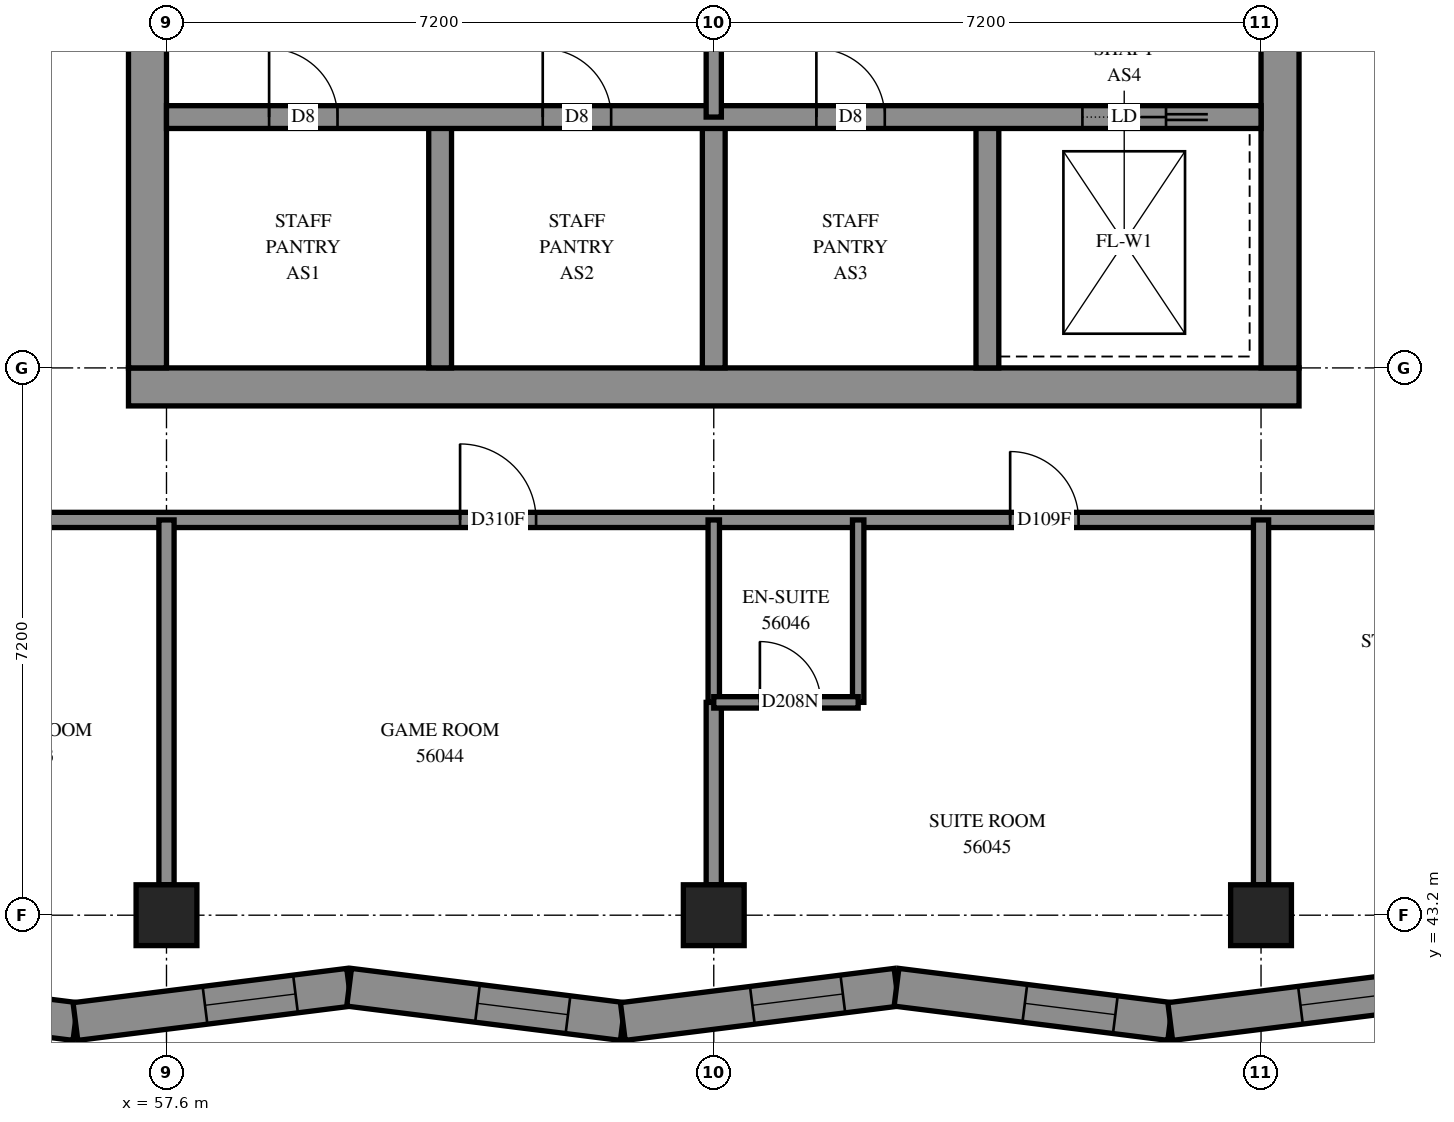
"""IFC4 building model, lengths in metres.
Left out: names, types, materials, properties, quantities, classifications, styles, units other than length and angle.
Written with IfcOpenShell. Run it as: python <this file> out.ifc"""

import sys

from ifc_helpers import new_model, si_unit, direction, frame, frame_2d, origin, origin_2d, place, context, subcontext, project, spatial, polyline, rectangle, outline, extrude, element, fill, save


model = new_model("IFC4")
c1 = context("Model", 3, precision=1e-05, world=origin(), true_north=direction((0.0, 1.0)))
c2 = subcontext(c1, "Body", "Model", "MODEL_VIEW")
j1 = project(units=[si_unit("LENGTHUNIT", "METRE"), si_unit("PLANEANGLEUNIT", "RADIAN")], contexts=[c1])
p1 = place(None, origin())
s1 = spatial("IfcSite", under=j1, at=p1, CompositionType="ELEMENT")
p2 = place(p1, origin())
s2 = spatial("IfcBuilding", under=s1, at=p2, CompositionType="ELEMENT")
p3 = place(p2, frame((0.0, 0.0, 206.6)))
s3 = spatial("IfcBuildingStorey", under=s2, at=p3, CompositionType="ELEMENT", Elevation=206.6)
for number, where, z_axis, x_axis in (
    (1, (57.6, 43.2, 0.0), (0.0, 0.0, 1.0), (1.0, 0.0, 0.0)),
    (2, (64.8, 43.2, 0.0), (0.0, 0.0, 1.0), (1.0, 0.0, 0.0)),
    (3, (72.0, 43.2, 0.0), (0.0, 0.0, 1.0), (1.0, 0.0, 0.0)),
):
    element("IfcColumn", number, at=place(p3, frame(where, z_axis=z_axis, x_axis=x_axis)), inside=s3, PredefinedType="COLUMN", context=c2, shape_type="SweptSolid", body=[
        extrude(rectangle(XDim=0.8, YDim=0.8, at=origin_2d()), origin(), (0.0, 0.0, 1.0), 3.1),
    ])
p4 = place(p3, frame((57.1, 50.15, -0.3), z_axis=(0.0, 0.0, 1.0), x_axis=(1.0, 0.0, 0.0)))
e4 = element("IfcWall", 4, at=p4, inside=s3, PredefinedType="SHEAR", context=c2, shape_type="SweptSolid", body=[
    extrude(rectangle(XDim=15.4, YDim=0.5, at=frame_2d((7.7, 0.0))), origin(), (0.0, 0.0, 1.0), 2.7),
])
p5 = place(p3, frame((57.35, 50.4, -0.3), z_axis=(0.0, 0.0, 1.0), x_axis=(0.0, 1.0, 0.0)))
e5 = element("IfcWall", 5, at=p5, inside=s3, PredefinedType="SHEAR", context=c2, shape_type="SweptSolid", body=[
    extrude(rectangle(XDim=14.4, YDim=0.5, at=frame_2d((7.2, 0.0))), origin(), (0.0, 0.0, 1.0), 2.7),
])
p6 = place(p5, frame((4.55, 0.0, 0.3)))
e6 = element("IfcOpeningElement", 6, at=p6, cuts=e5, PredefinedType="OPENING", context=c2, shape_type="SweptSolid", body=[
    extrude(rectangle(XDim=1.1, YDim=2.1, at=frame_2d((0.55, 1.05))), frame((0.0, 0.26, 0.0), z_axis=(0.0, -1.0, 0.0), x_axis=(1.0, 0.0, 0.0)), (0.0, 0.0, 1.0), 0.52),
])
p7 = place(p5, frame((11.35, 0.0, 0.3)))
e7 = element("IfcOpeningElement", 7, at=p7, cuts=e5, PredefinedType="OPENING", context=c2, shape_type="SweptSolid", body=[
    extrude(rectangle(XDim=1.1, YDim=2.1, at=frame_2d((0.55, 1.05))), frame((0.0, 0.26, 0.0), z_axis=(0.0, -1.0, 0.0), x_axis=(1.0, 0.0, 0.0)), (0.0, 0.0, 1.0), 0.52),
])
p8 = place(p3, frame((72.25, 50.4, -0.3), z_axis=(0.0, 0.0, 1.0), x_axis=(0.0, 1.0, 0.0)))
e8 = element("IfcWall", 8, at=p8, inside=s3, PredefinedType="SHEAR", context=c2, shape_type="SweptSolid", body=[
    extrude(rectangle(XDim=14.4, YDim=0.5, at=frame_2d((7.2, 0.0))), origin(), (0.0, 0.0, 1.0), 2.7),
])
p9 = place(p8, frame((4.55, 0.0, 0.3)))
e9 = element("IfcOpeningElement", 9, at=p9, cuts=e8, PredefinedType="OPENING", context=c2, shape_type="SweptSolid", body=[
    extrude(rectangle(XDim=1.1, YDim=2.1, at=frame_2d((0.55, 1.05))), frame((0.0, 0.26, 0.0), z_axis=(0.0, -1.0, 0.0), x_axis=(1.0, 0.0, 0.0)), (0.0, 0.0, 1.0), 0.52),
])
p10 = place(p8, frame((11.35, 0.0, 0.3)))
e10 = element("IfcOpeningElement", 10, at=p10, cuts=e8, PredefinedType="OPENING", context=c2, shape_type="SweptSolid", body=[
    extrude(rectangle(XDim=1.1, YDim=2.1, at=frame_2d((0.55, 1.05))), frame((0.0, 0.26, 0.0), z_axis=(0.0, -1.0, 0.0), x_axis=(1.0, 0.0, 0.0)), (0.0, 0.0, 1.0), 0.52),
])
for number, where, z_axis, x_axis in (
    (11, (61.2, 50.4, 0.0), (0.0, 0.0, 1.0), (0.0, 1.0, 0.0)),
    (12, (64.8, 50.4, 0.0), (0.0, 0.0, 1.0), (0.0, 1.0, 0.0)),
    (13, (68.4, 50.4, 0.0), (0.0, 0.0, 1.0), (0.0, 1.0, 0.0)),
):
    element("IfcWall", number, at=place(p3, frame(where, z_axis=z_axis, x_axis=x_axis)), inside=s3, PredefinedType="SOLIDWALL", context=c2, shape_type="SweptSolid", body=[
        extrude(rectangle(XDim=3.3, YDim=0.3, at=frame_2d((1.65, 0.0))), origin(), (0.0, 0.0, 1.0), 3.1),
    ])
p11 = place(p3, frame((57.6, 53.7, 0.0), z_axis=(0.0, 0.0, 1.0), x_axis=(1.0, 0.0, 0.0)))
e14 = element("IfcWall", 14, at=p11, inside=s3, PredefinedType="SOLIDWALL", context=c2, shape_type="SweptSolid", body=[
    extrude(rectangle(XDim=14.4, YDim=0.3, at=frame_2d((7.2, 0.0))), origin(), (0.0, 0.0, 1.0), 3.1),
])
p12 = place(p11, frame((1.35, 0.0, 0.0)))
e15 = element("IfcOpeningElement", 15, at=p12, cuts=e14, PredefinedType="OPENING", context=c2, shape_type="SweptSolid", body=[
    extrude(rectangle(XDim=0.9, YDim=2.1, at=frame_2d((0.45, 1.05))), frame((0.0, 0.16, 0.0), z_axis=(0.0, -1.0, 0.0), x_axis=(1.0, 0.0, 0.0)), (0.0, 0.0, 1.0), 0.32),
])
p13 = place(p11, frame((4.95, 0.0, 0.0)))
e16 = element("IfcOpeningElement", 16, at=p13, cuts=e14, PredefinedType="OPENING", context=c2, shape_type="SweptSolid", body=[
    extrude(rectangle(XDim=0.9, YDim=2.1, at=frame_2d((0.45, 1.05))), frame((0.0, 0.16, 0.0), z_axis=(0.0, -1.0, 0.0), x_axis=(1.0, 0.0, 0.0)), (0.0, 0.0, 1.0), 0.32),
])
p14 = place(p11, frame((8.55, 0.0, 0.0)))
e17 = element("IfcOpeningElement", 17, at=p14, cuts=e14, PredefinedType="OPENING", context=c2, shape_type="SweptSolid", body=[
    extrude(rectangle(XDim=0.9, YDim=2.1, at=frame_2d((0.45, 1.05))), frame((0.0, 0.16, 0.0), z_axis=(0.0, -1.0, 0.0), x_axis=(1.0, 0.0, 0.0)), (0.0, 0.0, 1.0), 0.32),
])
p15 = place(p11, frame((12.05, 0.0, 0.0)))
e18 = element("IfcOpeningElement", 18, at=p15, cuts=e14, PredefinedType="OPENING", context=c2, shape_type="SweptSolid", body=[
    extrude(rectangle(XDim=1.1, YDim=2.1, at=frame_2d((0.55, 1.05))), frame((0.0, 0.16, 0.0), z_axis=(0.0, -1.0, 0.0), x_axis=(1.0, 0.0, 0.0)), (0.0, 0.0, 1.0), 0.32),
])
p16 = place(p3, frame((52.781, 42.255, 0.0), z_axis=(0.0, 0.0, 1.0), x_axis=(0.9922491844, -0.1242640575, 0.0)))
e19 = element("IfcWall", 19, at=p16, inside=s3, PredefinedType="SOLIDWALL", context=c2, shape_type="SweptSolid", body=[
    extrude(outline(polyline([(0.052, -0.25), (3.681, -0.25), (3.618, 0.25), (-0.052, 0.25), (0.052, -0.25)])), origin(), (0.0, 0.0, 1.0), 3.1),
])
p17 = place(p16, frame((1.724, 0.0, 0.45)))
e20 = element("IfcOpeningElement", 20, at=p17, cuts=e19, PredefinedType="OPENING", context=c2, shape_type="SweptSolid", body=[
    extrude(rectangle(XDim=1.2, YDim=2.5, at=frame_2d((0.6, 1.25))), frame((0.0, 0.26, 0.0), z_axis=(0.0, -1.0, 0.0), x_axis=(1.0, 0.0, 0.0)), (0.0, 0.0, 1.0), 0.52),
])
p18 = place(p3, frame((56.402, 41.801, 0.0), z_axis=(0.0, 0.0, 1.0), x_axis=(0.9922477484, 0.124275524, 0.0)))
e21 = element("IfcWall", 21, at=p18, inside=s3, PredefinedType="SOLIDWALL", context=c2, shape_type="SweptSolid", body=[
    extrude(outline(polyline([(-0.031, -0.25), (3.598, -0.25), (3.66, 0.25), (0.031, 0.25), (-0.031, -0.25)])), origin(), (0.0, 0.0, 1.0), 3.1),
])
p19 = place(p18, frame((1.718, 0.0, 0.45)))
e22 = element("IfcOpeningElement", 22, at=p19, cuts=e21, PredefinedType="OPENING", context=c2, shape_type="SweptSolid", body=[
    extrude(rectangle(XDim=1.2, YDim=2.5, at=frame_2d((0.6, 1.25))), frame((0.0, 0.26, 0.0), z_axis=(0.0, -1.0, 0.0), x_axis=(1.0, 0.0, 0.0)), (0.0, 0.0, 1.0), 0.52),
])
p20 = place(p3, frame((60.003, 42.252, 0.0), z_axis=(0.0, 0.0, 1.0), x_axis=(0.9922477484, -0.124275524, 0.0)))
e23 = element("IfcWall", 23, at=p20, inside=s3, PredefinedType="SOLIDWALL", context=c2, shape_type="SweptSolid", body=[
    extrude(outline(polyline([(0.031, -0.25), (3.66, -0.25), (3.598, 0.25), (-0.031, 0.25), (0.031, -0.25)])), origin(), (0.0, 0.0, 1.0), 3.1),
])
p21 = place(p20, frame((1.702, 0.0, 0.45)))
e24 = element("IfcOpeningElement", 24, at=p21, cuts=e23, PredefinedType="OPENING", context=c2, shape_type="SweptSolid", body=[
    extrude(rectangle(XDim=1.2, YDim=2.5, at=frame_2d((0.6, 1.25))), frame((0.0, 0.26, 0.0), z_axis=(0.0, -1.0, 0.0), x_axis=(1.0, 0.0, 0.0)), (0.0, 0.0, 1.0), 0.52),
])
p22 = place(p3, frame((63.603, 41.801, 0.0), z_axis=(0.0, 0.0, 1.0), x_axis=(0.9922473228, 0.1242789221, 0.0)))
e25 = element("IfcWall", 25, at=p22, inside=s3, PredefinedType="SOLIDWALL", context=c2, shape_type="SweptSolid", body=[
    extrude(outline(polyline([(-0.031, -0.25), (3.598, -0.25), (3.66, 0.25), (0.031, 0.25), (-0.031, -0.25)])), origin(), (0.0, 0.0, 1.0), 3.1),
])
p23 = place(p22, frame((1.717, 0.0, 0.45)))
e26 = element("IfcOpeningElement", 26, at=p23, cuts=e25, PredefinedType="OPENING", context=c2, shape_type="SweptSolid", body=[
    extrude(rectangle(XDim=1.2, YDim=2.5, at=frame_2d((0.6, 1.25))), frame((0.0, 0.26, 0.0), z_axis=(0.0, -1.0, 0.0), x_axis=(1.0, 0.0, 0.0)), (0.0, 0.0, 1.0), 0.52),
])
p24 = place(p3, frame((67.204, 42.252, 0.0), z_axis=(0.0, 0.0, 1.0), x_axis=(0.9922477484, -0.124275524, 0.0)))
e27 = element("IfcWall", 27, at=p24, inside=s3, PredefinedType="SOLIDWALL", context=c2, shape_type="SweptSolid", body=[
    extrude(outline(polyline([(0.031, -0.25), (3.66, -0.25), (3.598, 0.25), (-0.031, 0.25), (0.031, -0.25)])), origin(), (0.0, 0.0, 1.0), 3.1),
])
p25 = place(p24, frame((1.701, 0.0, 0.45)))
e28 = element("IfcOpeningElement", 28, at=p25, cuts=e27, PredefinedType="OPENING", context=c2, shape_type="SweptSolid", body=[
    extrude(rectangle(XDim=1.2, YDim=2.5, at=frame_2d((0.6, 1.25))), frame((0.0, 0.26, 0.0), z_axis=(0.0, -1.0, 0.0), x_axis=(1.0, 0.0, 0.0)), (0.0, 0.0, 1.0), 0.52),
])
p26 = place(p3, frame((70.805, 41.801, 0.0), z_axis=(0.0, 0.0, 1.0), x_axis=(0.9922491844, 0.1242640575, 0.0)))
e29 = element("IfcWall", 29, at=p26, inside=s3, PredefinedType="SOLIDWALL", context=c2, shape_type="SweptSolid", body=[
    extrude(outline(polyline([(-0.031, -0.25), (3.598, -0.25), (3.701, 0.25), (0.031, 0.25), (-0.031, -0.25)])), origin(), (0.0, 0.0, 1.0), 3.1),
])
p27 = place(p26, frame((1.727, 0.0, 0.45)))
e30 = element("IfcOpeningElement", 30, at=p27, cuts=e29, PredefinedType="OPENING", context=c2, shape_type="SweptSolid", body=[
    extrude(rectangle(XDim=1.2, YDim=2.5, at=frame_2d((0.6, 1.25))), frame((0.0, 0.26, 0.0), z_axis=(0.0, -1.0, 0.0), x_axis=(1.0, 0.0, 0.0)), (0.0, 0.0, 1.0), 0.52),
])
p28 = place(p3, frame((64.8, 53.7, 0.0), z_axis=(0.0, 0.0, 1.0), x_axis=(0.0, 1.0, 0.0)))
e31 = element("IfcWall", 31, at=p28, inside=s3, PredefinedType="PARTITIONING", context=c2, shape_type="SweptSolid", body=[
    extrude(rectangle(XDim=3.6, YDim=0.2, at=frame_2d((1.8, 0.0))), origin(), (0.0, 0.0, 1.0), 3.1),
])
p29 = place(p3, frame((55.6, 48.4, 0.0), z_axis=(0.0, 0.0, 1.0), x_axis=(1.0, 0.0, 0.0)))
e32 = element("IfcWall", 32, at=p29, inside=s3, PredefinedType="PARTITIONING", context=c2, shape_type="SweptSolid", body=[
    extrude(rectangle(XDim=18.4, YDim=0.2, at=frame_2d((9.2, 0.0))), origin(), (0.0, 0.0, 1.0), 3.1),
])
p30 = place(p29, frame((5.862, 0.0, 0.0)))
e33 = element("IfcOpeningElement", 33, at=p30, cuts=e32, PredefinedType="OPENING", context=c2, shape_type="SweptSolid", body=[
    extrude(rectangle(XDim=1.0, YDim=2.1, at=frame_2d((0.5, 1.05))), frame((0.0, 0.11, 0.0), z_axis=(0.0, -1.0, 0.0), x_axis=(1.0, 0.0, 0.0)), (0.0, 0.0, 1.0), 0.22),
])
p31 = place(p29, frame((13.099, 0.0, 0.0)))
e34 = element("IfcOpeningElement", 34, at=p31, cuts=e32, PredefinedType="OPENING", context=c2, shape_type="SweptSolid", body=[
    extrude(rectangle(XDim=0.9, YDim=2.1, at=frame_2d((0.45, 1.05))), frame((0.0, 0.11, 0.0), z_axis=(0.0, -1.0, 0.0), x_axis=(1.0, 0.0, 0.0)), (0.0, 0.0, 1.0), 0.22),
])
for number, where, z_axis, x_axis in (
    (35, (57.6, 43.6, 0.0), (0.0, 0.0, 1.0), (0.0, 1.0, 0.0)),
    (36, (72.0, 43.6, 0.0), (0.0, 0.0, 1.0), (0.0, 1.0, 0.0)),
):
    element("IfcWall", number, at=place(p3, frame(where, z_axis=z_axis, x_axis=x_axis)), inside=s3, PredefinedType="PARTITIONING", context=c2, shape_type="SweptSolid", body=[
        extrude(rectangle(XDim=4.8, YDim=0.2, at=frame_2d((2.4, 0.0))), origin(), (0.0, 0.0, 1.0), 3.1),
    ])
p32 = place(p3, frame((64.8, 43.6, 0.0), z_axis=(0.0, 0.0, 1.0), x_axis=(0.0, 1.0, 0.0)))
e37 = element("IfcWall", 37, at=p32, inside=s3, PredefinedType="PARTITIONING", context=c2, shape_type="SweptSolid", body=[
    extrude(rectangle(XDim=2.4, YDim=0.2, at=frame_2d((1.2, 0.0))), origin(), (0.0, 0.0, 1.0), 3.1),
])
for number, where, z_axis, x_axis in (
    (38, (66.7, 46.0, 0.0), (0.0, 0.0, 1.0), (0.0, 1.0, 0.0)),
    (39, (64.8, 46.0, 0.0), (0.0, 0.0, 1.0), (0.0, 1.0, 0.0)),
):
    element("IfcWall", number, at=place(p3, frame(where, z_axis=z_axis, x_axis=x_axis)), inside=s3, PredefinedType="PARTITIONING", context=c2, shape_type="SweptSolid", body=[
        extrude(rectangle(XDim=2.4, YDim=0.15, at=frame_2d((1.2, 0.0))), origin(), (0.0, 0.0, 1.0), 3.1),
    ])
p33 = place(p3, frame((64.8, 46.0, 0.0), z_axis=(0.0, 0.0, 1.0), x_axis=(1.0, 0.0, 0.0)))
e40 = element("IfcWall", 40, at=p33, inside=s3, PredefinedType="PARTITIONING", context=c2, shape_type="SweptSolid", body=[
    extrude(rectangle(XDim=1.9, YDim=0.15, at=frame_2d((0.95, 0.0))), origin(), (0.0, 0.0, 1.0), 3.1),
])
p34 = place(p33, frame((0.607, 0.0, 0.0)))
e41 = element("IfcOpeningElement", 41, at=p34, cuts=e40, PredefinedType="OPENING", context=c2, shape_type="SweptSolid", body=[
    extrude(rectangle(XDim=0.8, YDim=2.1, at=frame_2d((0.4, 1.05))), frame((0.0, 0.085, 0.0), z_axis=(0.0, -1.0, 0.0), x_axis=(1.0, 0.0, 0.0)), (0.0, 0.0, 1.0), 0.17),
])
p35 = place(p19, origin())
e42 = element("IfcWindow", 42, at=p35, inside=s3, PartitioningType="SINGLE_PANEL", PredefinedType="WINDOW", context=c2, shape_type="SweptSolid", body=[
    extrude(rectangle(XDim=1.2, YDim=2.5, at=frame_2d((0.6, 1.25))), frame((0.0, 0.18, 0.0), z_axis=(0.0, -1.0, 0.0), x_axis=(1.0, 0.0, 0.0)), (0.0, 0.0, 1.0), 0.06),
])
fill(e22, e42)
p36 = place(p21, origin())
e43 = element("IfcWindow", 43, at=p36, inside=s3, PartitioningType="SINGLE_PANEL", PredefinedType="WINDOW", context=c2, shape_type="SweptSolid", body=[
    extrude(rectangle(XDim=1.2, YDim=2.5, at=frame_2d((0.6, 1.25))), frame((0.0, 0.18, 0.0), z_axis=(0.0, -1.0, 0.0), x_axis=(1.0, 0.0, 0.0)), (0.0, 0.0, 1.0), 0.06),
])
fill(e24, e43)
p37 = place(p23, origin())
e44 = element("IfcWindow", 44, at=p37, inside=s3, PartitioningType="SINGLE_PANEL", PredefinedType="WINDOW", context=c2, shape_type="SweptSolid", body=[
    extrude(rectangle(XDim=1.2, YDim=2.5, at=frame_2d((0.6, 1.25))), frame((0.0, 0.18, 0.0), z_axis=(0.0, -1.0, 0.0), x_axis=(1.0, 0.0, 0.0)), (0.0, 0.0, 1.0), 0.06),
])
fill(e26, e44)
p38 = place(p25, origin())
e45 = element("IfcWindow", 45, at=p38, inside=s3, PartitioningType="SINGLE_PANEL", PredefinedType="WINDOW", context=c2, shape_type="SweptSolid", body=[
    extrude(rectangle(XDim=1.2, YDim=2.5, at=frame_2d((0.6, 1.25))), frame((0.0, 0.18, 0.0), z_axis=(0.0, -1.0, 0.0), x_axis=(1.0, 0.0, 0.0)), (0.0, 0.0, 1.0), 0.06),
])
fill(e28, e45)
p39 = place(p27, origin())
e46 = element("IfcWindow", 46, at=p39, inside=s3, PartitioningType="SINGLE_PANEL", PredefinedType="WINDOW", context=c2, shape_type="SweptSolid", body=[
    extrude(rectangle(XDim=1.2, YDim=2.5, at=frame_2d((0.6, 1.25))), frame((0.0, 0.18, 0.0), z_axis=(0.0, -1.0, 0.0), x_axis=(1.0, 0.0, 0.0)), (0.0, 0.0, 1.0), 0.06),
])
fill(e30, e46)
p40 = place(p12, origin())
e47 = element("IfcDoor", 47, at=p40, inside=s3, OperationType="SINGLE_SWING_LEFT", PredefinedType="DOOR", context=c2, shape_type="SweptSolid", body=[
    extrude(rectangle(XDim=0.9, YDim=2.1, at=frame_2d((0.45, 1.05))), frame((0.0, 0.025, 0.0), z_axis=(0.0, -1.0, 0.0), x_axis=(1.0, 0.0, 0.0)), (0.0, 0.0, 1.0), 0.05),
])
fill(e15, e47)
p41 = place(p13, origin())
e48 = element("IfcDoor", 48, at=p41, inside=s3, OperationType="SINGLE_SWING_LEFT", PredefinedType="DOOR", context=c2, shape_type="SweptSolid", body=[
    extrude(rectangle(XDim=0.9, YDim=2.1, at=frame_2d((0.45, 1.05))), frame((0.0, 0.025, 0.0), z_axis=(0.0, -1.0, 0.0), x_axis=(1.0, 0.0, 0.0)), (0.0, 0.0, 1.0), 0.05),
])
fill(e16, e48)
p42 = place(p14, origin())
e49 = element("IfcDoor", 49, at=p42, inside=s3, OperationType="SINGLE_SWING_LEFT", PredefinedType="DOOR", context=c2, shape_type="SweptSolid", body=[
    extrude(rectangle(XDim=0.9, YDim=2.1, at=frame_2d((0.45, 1.05))), frame((0.0, 0.025, 0.0), z_axis=(0.0, -1.0, 0.0), x_axis=(1.0, 0.0, 0.0)), (0.0, 0.0, 1.0), 0.05),
])
fill(e17, e49)
p43 = place(p15, origin())
e50 = element("IfcDoor", 50, at=p43, inside=s3, OperationType="SLIDING_TO_RIGHT", PredefinedType="DOOR", context=c2, shape_type="SweptSolid", body=[
    extrude(rectangle(XDim=1.1, YDim=2.1, at=frame_2d((0.55, 1.05))), frame((0.0, 0.025, 0.0), z_axis=(0.0, -1.0, 0.0), x_axis=(1.0, 0.0, 0.0)), (0.0, 0.0, 1.0), 0.05),
])
fill(e18, e50)
p44 = place(p30, origin())
e51 = element("IfcDoor", 51, at=p44, inside=s3, OperationType="SINGLE_SWING_LEFT", PredefinedType="DOOR", context=c2, shape_type="SweptSolid", body=[
    extrude(rectangle(XDim=1.0, YDim=2.1, at=frame_2d((0.5, 1.05))), frame((0.0, 0.025, 0.0), z_axis=(0.0, -1.0, 0.0), x_axis=(1.0, 0.0, 0.0)), (0.0, 0.0, 1.0), 0.05),
])
fill(e33, e51)
p45 = place(p31, origin())
e52 = element("IfcDoor", 52, at=p45, inside=s3, OperationType="SINGLE_SWING_LEFT", PredefinedType="DOOR", context=c2, shape_type="SweptSolid", body=[
    extrude(rectangle(XDim=0.9, YDim=2.1, at=frame_2d((0.45, 1.05))), frame((0.0, 0.025, 0.0), z_axis=(0.0, -1.0, 0.0), x_axis=(1.0, 0.0, 0.0)), (0.0, 0.0, 1.0), 0.05),
])
fill(e34, e52)
p46 = place(p34, origin())
e53 = element("IfcDoor", 53, at=p46, inside=s3, OperationType="SINGLE_SWING_RIGHT", PredefinedType="DOOR", context=c2, shape_type="SweptSolid", body=[
    extrude(rectangle(XDim=0.8, YDim=2.1, at=frame_2d((0.4, 1.05))), frame((0.0, 0.025, 0.0), z_axis=(0.0, -1.0, 0.0), x_axis=(1.0, 0.0, 0.0)), (0.0, 0.0, 1.0), 0.05),
])
fill(e41, e53)
save(model, sys.argv[1])
